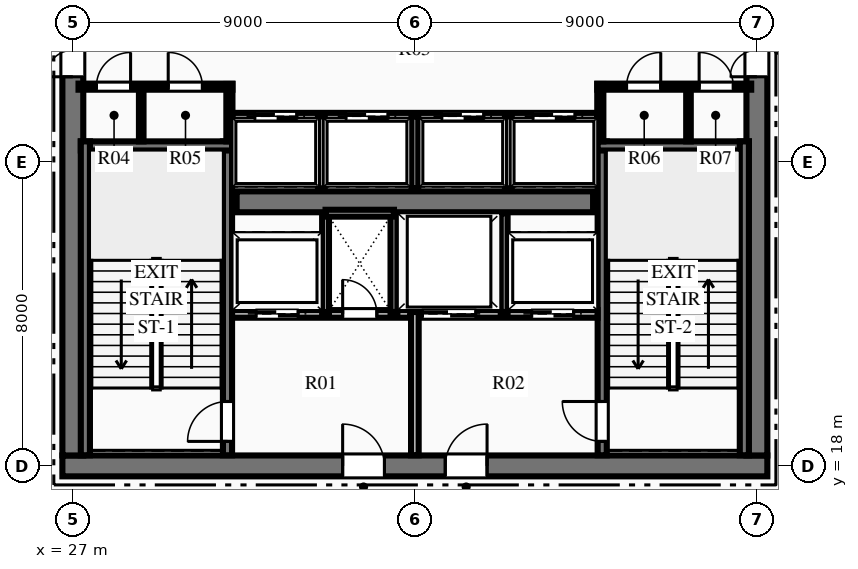
"""IFC4 building model, lengths in metres.
Left out: names, types, materials, properties, quantities, classifications, styles, units other than length and angle.
Written with IfcOpenShell. Run it as: python <this file> out.ifc"""

import sys

from ifc_helpers import new_model, si_unit, direction, frame, frame_2d, origin, place, context, subcontext, project, spatial, rectangle, extrude, element, fill, save


model = new_model("IFC4")
c1 = context("Model", 3, precision=1e-05, world=origin(), true_north=direction((0.0, 1.0)))
c2 = subcontext(c1, "Body", "Model", "MODEL_VIEW")
j1 = project(units=[si_unit("LENGTHUNIT", "METRE"), si_unit("PLANEANGLEUNIT", "RADIAN")], contexts=[c1])
p1 = place(None, origin())
s1 = spatial("IfcSite", under=j1, at=p1, CompositionType="ELEMENT")
p2 = place(p1, origin())
s2 = spatial("IfcBuilding", under=s1, at=p2, CompositionType="ELEMENT")
p3 = place(p2, frame((0.0, 0.0, 85.95)))
s3 = spatial("IfcBuildingStorey", under=s2, at=p3, CompositionType="ELEMENT", Elevation=85.95)
p4 = place(p3, frame((26.725, 18.0, 0.0), z_axis=(0.0, 0.0, 1.0), x_axis=(1.0, 0.0, 0.0)))
e1 = element("IfcWall", 1, at=p4, inside=s3, PredefinedType="SHEAR", context=c2, shape_type="SweptSolid", body=[
    extrude(rectangle(XDim=18.55, YDim=0.55, at=frame_2d((9.275, 0.0))), origin(), (0.0, 0.0, 1.0), 4.5),
])
p5 = place(p4, frame((7.375, 0.0, 0.0)))
e2 = element("IfcOpeningElement", 2, at=p5, cuts=e1, PredefinedType="OPENING", context=c2, shape_type="SweptSolid", body=[
    extrude(rectangle(XDim=1.1, YDim=2.15, at=frame_2d((0.55, 1.075))), frame((0.0, 0.285, 0.0), z_axis=(0.0, -1.0, 0.0), x_axis=(1.0, 0.0, 0.0)), (0.0, 0.0, 1.0), 0.57),
])
p6 = place(p4, frame((10.075, 0.0, 0.0)))
e3 = element("IfcOpeningElement", 3, at=p6, cuts=e1, PredefinedType="OPENING", context=c2, shape_type="SweptSolid", body=[
    extrude(rectangle(XDim=1.1, YDim=2.15, at=frame_2d((0.55, 1.075))), frame((0.0, 0.285, 0.0), z_axis=(0.0, -1.0, 0.0), x_axis=(1.0, 0.0, 0.0)), (0.0, 0.0, 1.0), 0.57),
])
p7 = place(p3, frame((27.0, 18.275, 0.0), z_axis=(0.0, 0.0, 1.0), x_axis=(0.0, 1.0, 0.0)))
e4 = element("IfcWall", 4, at=p7, inside=s3, PredefinedType="SHEAR", context=c2, shape_type="SweptSolid", body=[
    extrude(rectangle(XDim=15.45, YDim=0.55, at=frame_2d((7.725, 0.0))), origin(), (0.0, 0.0, 1.0), 4.5),
])
p8 = place(p7, frame((9.965, 0.0, 0.0)))
e5 = element("IfcOpeningElement", 5, at=p8, cuts=e4, PredefinedType="OPENING", context=c2, shape_type="SweptSolid", body=[
    extrude(rectangle(XDim=1.4, YDim=2.2, at=frame_2d((0.7, 1.1))), frame((0.0, 0.285, 0.0), z_axis=(0.0, -1.0, 0.0), x_axis=(1.0, 0.0, 0.0)), (0.0, 0.0, 1.0), 0.57),
])
p9 = place(p3, frame((45.0, 18.275, 0.0), z_axis=(0.0, 0.0, 1.0), x_axis=(0.0, 1.0, 0.0)))
e6 = element("IfcWall", 6, at=p9, inside=s3, PredefinedType="SHEAR", context=c2, shape_type="SweptSolid", body=[
    extrude(rectangle(XDim=15.45, YDim=0.55, at=frame_2d((7.725, 0.0))), origin(), (0.0, 0.0, 1.0), 4.5),
])
p10 = place(p9, frame((9.965, 0.0, 0.0)))
e7 = element("IfcOpeningElement", 7, at=p10, cuts=e6, PredefinedType="OPENING", context=c2, shape_type="SweptSolid", body=[
    extrude(rectangle(XDim=1.4, YDim=2.2, at=frame_2d((0.7, 1.1))), frame((0.0, 0.285, 0.0), z_axis=(0.0, -1.0, 0.0), x_axis=(1.0, 0.0, 0.0)), (0.0, 0.0, 1.0), 0.57),
])
p11 = place(p3, frame((31.31, 24.95, 0.0), z_axis=(0.0, 0.0, 1.0), x_axis=(1.0, 0.0, 0.0)))
e8 = element("IfcWall", 8, at=p11, inside=s3, PredefinedType="SHEAR", context=c2, shape_type="SweptSolid", body=[
    extrude(rectangle(XDim=9.38, YDim=0.55, at=frame_2d((4.69, 0.0))), origin(), (0.0, 0.0, 1.0), 4.5),
])
p12 = place(p3, frame((31.07, 18.28, 0.0), z_axis=(0.0, 0.0, 1.0), x_axis=(0.0, 1.0, 0.0)))
e9 = element("IfcWall", 9, at=p12, inside=s3, PredefinedType="SHEAR", context=c2, shape_type="SweptSolid", body=[
    extrude(rectangle(XDim=8.26, YDim=0.24, at=frame_2d((4.13, 0.0))), origin(), (0.0, 0.0, 1.0), 4.5),
])
p13 = place(p12, frame((0.365, 0.0, 0.0)))
e10 = element("IfcOpeningElement", 10, at=p13, cuts=e9, PredefinedType="OPENING", context=c2, shape_type="SweptSolid", body=[
    extrude(rectangle(XDim=1.05, YDim=2.15, at=frame_2d((0.525, 1.075))), frame((0.0, 0.13, 0.0), z_axis=(0.0, -1.0, 0.0), x_axis=(1.0, 0.0, 0.0)), (0.0, 0.0, 1.0), 0.26),
])
p14 = place(p3, frame((27.21, 26.42, 0.0), z_axis=(0.0, 0.0, 1.0), x_axis=(1.0, 0.0, 0.0)))
e11 = element("IfcWall", 11, at=p14, inside=s3, PredefinedType="SHEAR", context=c2, shape_type="SweptSolid", body=[
    extrude(rectangle(XDim=3.98, YDim=0.24, at=frame_2d((1.99, 0.0))), origin(), (0.0, 0.0, 1.0), 4.5),
])
p15 = place(p3, frame((27.33, 18.28, 0.0), z_axis=(0.0, 0.0, 1.0), x_axis=(0.0, 1.0, 0.0)))
e12 = element("IfcWall", 12, at=p15, inside=s3, PredefinedType="SHEAR", context=c2, shape_type="SweptSolid", body=[
    extrude(rectangle(XDim=8.26, YDim=0.24, at=frame_2d((4.13, 0.0))), origin(), (0.0, 0.0, 1.0), 4.5),
])
p16 = place(p3, frame((40.93, 18.28, 0.0), z_axis=(0.0, 0.0, 1.0), x_axis=(0.0, 1.0, 0.0)))
e13 = element("IfcWall", 13, at=p16, inside=s3, PredefinedType="SHEAR", context=c2, shape_type="SweptSolid", body=[
    extrude(rectangle(XDim=8.26, YDim=0.24, at=frame_2d((4.13, 0.0))), origin(), (0.0, 0.0, 1.0), 4.5),
])
p17 = place(p16, frame((0.365, 0.0, 0.0)))
e14 = element("IfcOpeningElement", 14, at=p17, cuts=e13, PredefinedType="OPENING", context=c2, shape_type="SweptSolid", body=[
    extrude(rectangle(XDim=1.05, YDim=2.15, at=frame_2d((0.525, 1.075))), frame((0.0, 0.13, 0.0), z_axis=(0.0, -1.0, 0.0), x_axis=(1.0, 0.0, 0.0)), (0.0, 0.0, 1.0), 0.26),
])
p18 = place(p3, frame((40.81, 26.42, 0.0), z_axis=(0.0, 0.0, 1.0), x_axis=(1.0, 0.0, 0.0)))
e15 = element("IfcWall", 15, at=p18, inside=s3, PredefinedType="SHEAR", context=c2, shape_type="SweptSolid", body=[
    extrude(rectangle(XDim=3.98, YDim=0.24, at=frame_2d((1.99, 0.0))), origin(), (0.0, 0.0, 1.0), 4.5),
])
p19 = place(p3, frame((44.67, 18.28, 0.0), z_axis=(0.0, 0.0, 1.0), x_axis=(0.0, 1.0, 0.0)))
e16 = element("IfcWall", 16, at=p19, inside=s3, PredefinedType="SHEAR", context=c2, shape_type="SweptSolid", body=[
    extrude(rectangle(XDim=8.26, YDim=0.24, at=frame_2d((4.13, 0.0))), origin(), (0.0, 0.0, 1.0), 4.5),
])
p20 = place(p3, frame((36.0, 18.28, 0.0), z_axis=(0.0, 0.0, 1.0), x_axis=(0.0, 1.0, 0.0)))
e17 = element("IfcWall", 17, at=p20, inside=s3, PredefinedType="PARTITIONING", context=c2, shape_type="SweptSolid", body=[
    extrude(rectangle(XDim=3.77, YDim=0.2, at=frame_2d((1.885, 0.0))), origin(), (0.0, 0.0, 1.0), 4.2),
])
p21 = place(p3, frame((31.19, 22.0, 0.0), z_axis=(0.0, 0.0, 1.0), x_axis=(1.0, 0.0, 0.0)))
e18 = element("IfcWall", 18, at=p21, inside=s3, PredefinedType="PARTITIONING", context=c2, shape_type="SweptSolid", body=[
    extrude(rectangle(XDim=4.69, YDim=0.2, at=frame_2d((2.345, 0.0))), origin(), (0.0, 0.0, 1.0), 4.2),
])
p22 = place(p21, frame((2.91, 0.0, 0.0)))
e19 = element("IfcOpeningElement", 19, at=p22, cuts=e18, PredefinedType="OPENING", context=c2, shape_type="SweptSolid", body=[
    extrude(rectangle(XDim=0.9, YDim=2.15, at=frame_2d((0.45, 1.075))), frame((0.0, 0.11, 0.0), z_axis=(0.0, -1.0, 0.0), x_axis=(1.0, 0.0, 0.0)), (0.0, 0.0, 1.0), 0.22),
])
p23 = place(p21, frame((0.635, 0.0, 0.0)))
e20 = element("IfcOpeningElement", 20, at=p23, cuts=e18, PredefinedType="OPENING", context=c2, shape_type="SweptSolid", body=[
    extrude(rectangle(XDim=1.1, YDim=2.15, at=frame_2d((0.55, 1.075))), frame((0.0, 0.11, 0.0), z_axis=(0.0, -1.0, 0.0), x_axis=(1.0, 0.0, 0.0)), (0.0, 0.0, 1.0), 0.22),
])
p24 = place(p3, frame((36.12, 22.0, 0.0), z_axis=(0.0, 0.0, 1.0), x_axis=(1.0, 0.0, 0.0)))
e21 = element("IfcWall", 21, at=p24, inside=s3, PredefinedType="PARTITIONING", context=c2, shape_type="SweptSolid", body=[
    extrude(rectangle(XDim=4.69, YDim=0.2, at=frame_2d((2.345, 0.0))), origin(), (0.0, 0.0, 1.0), 4.2),
])
p25 = place(p24, frame((2.955, 0.0, 0.0)))
e22 = element("IfcOpeningElement", 22, at=p25, cuts=e21, PredefinedType="OPENING", context=c2, shape_type="SweptSolid", body=[
    extrude(rectangle(XDim=1.1, YDim=2.15, at=frame_2d((0.55, 1.075))), frame((0.0, 0.11, 0.0), z_axis=(0.0, -1.0, 0.0), x_axis=(1.0, 0.0, 0.0)), (0.0, 0.0, 1.0), 0.22),
])
p26 = place(p24, frame((0.08, 0.0, 0.0)))
e23 = element("IfcOpeningElement", 23, at=p26, cuts=e21, PredefinedType="OPENING", context=c2, shape_type="SweptSolid", body=[
    extrude(rectangle(XDim=1.4, YDim=2.2, at=frame_2d((0.7, 1.1))), frame((0.0, 0.11, 0.0), z_axis=(0.0, -1.0, 0.0), x_axis=(1.0, 0.0, 0.0)), (0.0, 0.0, 1.0), 0.22),
])
for number, where, z_axis, x_axis in (
    (24, (33.65, 22.05, 0.0), (0.0, 0.0, 1.0), (0.0, 1.0, 0.0)),
    (25, (35.45, 22.05, 0.0), (0.0, 0.0, 1.0), (0.0, 1.0, 0.0)),
):
    element("IfcWall", number, at=place(p3, frame(where, z_axis=z_axis, x_axis=x_axis)), inside=s3, PredefinedType="PARTITIONING", context=c2, shape_type="SweptSolid", body=[
        extrude(rectangle(XDim=2.6, YDim=0.18, at=frame_2d((1.3, 0.0))), origin(), (0.0, 0.0, 1.0), 4.2),
    ])
p27 = place(p3, frame((33.65, 24.65, 0.0), z_axis=(0.0, 0.0, 1.0), x_axis=(1.0, 0.0, 0.0)))
e26 = element("IfcWall", 26, at=p27, inside=s3, PredefinedType="PARTITIONING", context=c2, shape_type="SweptSolid", body=[
    extrude(rectangle(XDim=1.8, YDim=0.18, at=frame_2d((0.9, 0.0))), origin(), (0.0, 0.0, 1.0), 4.2),
])
p28 = place(p3, frame((38.35, 22.05, 0.0), z_axis=(0.0, 0.0, 1.0), x_axis=(0.0, 1.0, 0.0)))
e27 = element("IfcWall", 27, at=p28, inside=s3, PredefinedType="PARTITIONING", context=c2, shape_type="SweptSolid", body=[
    extrude(rectangle(XDim=2.6, YDim=0.18, at=frame_2d((1.3, 0.0))), origin(), (0.0, 0.0, 1.0), 4.2),
])
p29 = place(p3, frame((27.15, 27.98, 0.0), z_axis=(0.0, 0.0, 1.0), x_axis=(1.0, 0.0, 0.0)))
e28 = element("IfcWall", 28, at=p29, inside=s3, PredefinedType="PARTITIONING", context=c2, shape_type="SweptSolid", body=[
    extrude(rectangle(XDim=4.05, YDim=0.16, at=frame_2d((2.025, 0.0))), origin(), (0.0, 0.0, 1.0), 4.2),
])
p30 = place(p29, frame((0.47, 0.0, 0.0)))
e29 = element("IfcOpeningElement", 29, at=p30, cuts=e28, PredefinedType="OPENING", context=c2, shape_type="SweptSolid", body=[
    extrude(rectangle(XDim=0.9, YDim=2.15, at=frame_2d((0.45, 1.075))), frame((0.0, 0.09, 0.0), z_axis=(0.0, -1.0, 0.0), x_axis=(1.0, 0.0, 0.0)), (0.0, 0.0, 1.0), 0.18),
])
p31 = place(p29, frame((2.36, 0.0, 0.0)))
e30 = element("IfcOpeningElement", 30, at=p31, cuts=e28, PredefinedType="OPENING", context=c2, shape_type="SweptSolid", body=[
    extrude(rectangle(XDim=0.9, YDim=2.15, at=frame_2d((0.45, 1.075))), frame((0.0, 0.09, 0.0), z_axis=(0.0, -1.0, 0.0), x_axis=(1.0, 0.0, 0.0)), (0.0, 0.0, 1.0), 0.18),
])
p32 = place(p3, frame((31.12, 26.54, 0.0), z_axis=(0.0, 0.0, 1.0), x_axis=(0.0, 1.0, 0.0)))
e31 = element("IfcWall", 31, at=p32, inside=s3, PredefinedType="PARTITIONING", context=c2, shape_type="SweptSolid", body=[
    extrude(rectangle(XDim=1.51, YDim=0.16, at=frame_2d((0.755, 0.0))), origin(), (0.0, 0.0, 1.0), 4.2),
])
p33 = place(p3, frame((40.8, 27.98, 0.0), z_axis=(0.0, 0.0, 1.0), x_axis=(1.0, 0.0, 0.0)))
e32 = element("IfcWall", 32, at=p33, inside=s3, PredefinedType="PARTITIONING", context=c2, shape_type="SweptSolid", body=[
    extrude(rectangle(XDim=4.05, YDim=0.16, at=frame_2d((2.025, 0.0))), origin(), (0.0, 0.0, 1.0), 4.2),
])
p34 = place(p33, frame((0.77, 0.0, 0.0)))
e33 = element("IfcOpeningElement", 33, at=p34, cuts=e32, PredefinedType="OPENING", context=c2, shape_type="SweptSolid", body=[
    extrude(rectangle(XDim=0.9, YDim=2.15, at=frame_2d((0.45, 1.075))), frame((0.0, 0.09, 0.0), z_axis=(0.0, -1.0, 0.0), x_axis=(1.0, 0.0, 0.0)), (0.0, 0.0, 1.0), 0.18),
])
p35 = place(p33, frame((2.68, 0.0, 0.0)))
e34 = element("IfcOpeningElement", 34, at=p35, cuts=e32, PredefinedType="OPENING", context=c2, shape_type="SweptSolid", body=[
    extrude(rectangle(XDim=0.9, YDim=2.15, at=frame_2d((0.45, 1.075))), frame((0.0, 0.09, 0.0), z_axis=(0.0, -1.0, 0.0), x_axis=(1.0, 0.0, 0.0)), (0.0, 0.0, 1.0), 0.18),
])
p36 = place(p3, frame((40.88, 26.54, 0.0), z_axis=(0.0, 0.0, 1.0), x_axis=(0.0, 1.0, 0.0)))
e35 = element("IfcWall", 35, at=p36, inside=s3, PredefinedType="PARTITIONING", context=c2, shape_type="SweptSolid", body=[
    extrude(rectangle(XDim=1.51, YDim=0.16, at=frame_2d((0.755, 0.0))), origin(), (0.0, 0.0, 1.0), 4.2),
])
for number, where, z_axis, x_axis in (
    (36, (28.8, 26.54, 0.0), (0.0, 0.0, 1.0), (0.0, 1.0, 0.0)),
    (37, (43.2, 26.54, 0.0), (0.0, 0.0, 1.0), (0.0, 1.0, 0.0)),
):
    element("IfcWall", number, at=place(p3, frame(where, z_axis=z_axis, x_axis=x_axis)), inside=s3, PredefinedType="PARTITIONING", context=c2, shape_type="SweptSolid", body=[
        extrude(rectangle(XDim=1.44, YDim=0.12, at=frame_2d((0.72, 0.0))), origin(), (0.0, 0.0, 1.0), 4.2),
    ])
p37 = place(p3, frame((31.2, 27.2, 0.0), z_axis=(0.0, 0.0, 1.0), x_axis=(1.0, 0.0, 0.0)))
e38 = element("IfcWall", 38, at=p37, inside=s3, PredefinedType="PARTITIONING", context=c2, shape_type="SweptSolid", body=[
    extrude(rectangle(XDim=9.6, YDim=0.18, at=frame_2d((4.8, 0.0))), origin(), (0.0, 0.0, 1.0), 4.2),
])
p38 = place(p37, frame((0.59, 0.0, 0.0)))
e39 = element("IfcOpeningElement", 39, at=p38, cuts=e38, PredefinedType="OPENING", context=c2, shape_type="SweptSolid", body=[
    extrude(rectangle(XDim=1.1, YDim=2.15, at=frame_2d((0.55, 1.075))), frame((0.0, 0.1, 0.0), z_axis=(0.0, -1.0, 0.0), x_axis=(1.0, 0.0, 0.0)), (0.0, 0.0, 1.0), 0.2),
])
p39 = place(p37, frame((2.99, 0.0, 0.0)))
e40 = element("IfcOpeningElement", 40, at=p39, cuts=e38, PredefinedType="OPENING", context=c2, shape_type="SweptSolid", body=[
    extrude(rectangle(XDim=1.1, YDim=2.15, at=frame_2d((0.55, 1.075))), frame((0.0, 0.1, 0.0), z_axis=(0.0, -1.0, 0.0), x_axis=(1.0, 0.0, 0.0)), (0.0, 0.0, 1.0), 0.2),
])
p40 = place(p37, frame((5.51, 0.0, 0.0)))
e41 = element("IfcOpeningElement", 41, at=p40, cuts=e38, PredefinedType="OPENING", context=c2, shape_type="SweptSolid", body=[
    extrude(rectangle(XDim=1.1, YDim=2.15, at=frame_2d((0.55, 1.075))), frame((0.0, 0.1, 0.0), z_axis=(0.0, -1.0, 0.0), x_axis=(1.0, 0.0, 0.0)), (0.0, 0.0, 1.0), 0.2),
])
p41 = place(p37, frame((7.91, 0.0, 0.0)))
e42 = element("IfcOpeningElement", 42, at=p41, cuts=e38, PredefinedType="OPENING", context=c2, shape_type="SweptSolid", body=[
    extrude(rectangle(XDim=1.1, YDim=2.15, at=frame_2d((0.55, 1.075))), frame((0.0, 0.1, 0.0), z_axis=(0.0, -1.0, 0.0), x_axis=(1.0, 0.0, 0.0)), (0.0, 0.0, 1.0), 0.2),
])
for number, where, z_axis, x_axis in (
    (43, (33.54, 25.3, 0.0), (0.0, 0.0, 1.0), (0.0, 1.0, 0.0)),
    (44, (36.0, 25.3, 0.0), (0.0, 0.0, 1.0), (0.0, 1.0, 0.0)),
    (45, (38.46, 25.3, 0.0), (0.0, 0.0, 1.0), (0.0, 1.0, 0.0)),
):
    element("IfcWall", number, at=place(p3, frame(where, z_axis=z_axis, x_axis=x_axis)), inside=s3, PredefinedType="PARTITIONING", context=c2, shape_type="SweptSolid", body=[
        extrude(rectangle(XDim=1.9, YDim=0.18, at=frame_2d((0.95, 0.0))), origin(), (0.0, 0.0, 1.0), 4.2),
    ])
p42 = place(p30, origin())
e46 = element("IfcDoor", 46, at=p42, inside=s3, OperationType="SINGLE_SWING_RIGHT", PredefinedType="DOOR", context=c2, shape_type="SweptSolid", body=[
    extrude(rectangle(XDim=0.9, YDim=2.15, at=frame_2d((0.45, 1.075))), frame((0.0, 0.025, 0.0), z_axis=(0.0, -1.0, 0.0), x_axis=(1.0, 0.0, 0.0)), (0.0, 0.0, 1.0), 0.05),
])
fill(e29, e46)
p43 = place(p31, origin())
e47 = element("IfcDoor", 47, at=p43, inside=s3, OperationType="SINGLE_SWING_LEFT", PredefinedType="DOOR", context=c2, shape_type="SweptSolid", body=[
    extrude(rectangle(XDim=0.9, YDim=2.15, at=frame_2d((0.45, 1.075))), frame((0.0, 0.025, 0.0), z_axis=(0.0, -1.0, 0.0), x_axis=(1.0, 0.0, 0.0)), (0.0, 0.0, 1.0), 0.05),
])
fill(e30, e47)
p44 = place(p34, origin())
e48 = element("IfcDoor", 48, at=p44, inside=s3, OperationType="SINGLE_SWING_RIGHT", PredefinedType="DOOR", context=c2, shape_type="SweptSolid", body=[
    extrude(rectangle(XDim=0.9, YDim=2.15, at=frame_2d((0.45, 1.075))), frame((0.0, 0.025, 0.0), z_axis=(0.0, -1.0, 0.0), x_axis=(1.0, 0.0, 0.0)), (0.0, 0.0, 1.0), 0.05),
])
fill(e33, e48)
p45 = place(p35, origin())
e49 = element("IfcDoor", 49, at=p45, inside=s3, OperationType="SINGLE_SWING_LEFT", PredefinedType="DOOR", context=c2, shape_type="SweptSolid", body=[
    extrude(rectangle(XDim=0.9, YDim=2.15, at=frame_2d((0.45, 1.075))), frame((0.0, 0.025, 0.0), z_axis=(0.0, -1.0, 0.0), x_axis=(1.0, 0.0, 0.0)), (0.0, 0.0, 1.0), 0.05),
])
fill(e34, e49)
p46 = place(p13, origin())
e50 = element("IfcDoor", 50, at=p46, inside=s3, OperationType="SINGLE_SWING_LEFT", PredefinedType="DOOR", context=c2, shape_type="SweptSolid", body=[
    extrude(rectangle(XDim=1.05, YDim=2.15, at=frame_2d((0.525, 1.075))), frame((0.0, 0.025, 0.0), z_axis=(0.0, -1.0, 0.0), x_axis=(1.0, 0.0, 0.0)), (0.0, 0.0, 1.0), 0.05),
])
fill(e10, e50)
p47 = place(p17, origin())
e51 = element("IfcDoor", 51, at=p47, inside=s3, OperationType="SINGLE_SWING_RIGHT", PredefinedType="DOOR", context=c2, shape_type="SweptSolid", body=[
    extrude(rectangle(XDim=1.05, YDim=2.15, at=frame_2d((0.525, 1.075))), frame((0.0, 0.025, 0.0), z_axis=(0.0, -1.0, 0.0), x_axis=(1.0, 0.0, 0.0)), (0.0, 0.0, 1.0), 0.05),
])
fill(e14, e51)
p48 = place(p5, origin())
e52 = element("IfcDoor", 52, at=p48, inside=s3, OperationType="SINGLE_SWING_LEFT", PredefinedType="DOOR", context=c2, shape_type="SweptSolid", body=[
    extrude(rectangle(XDim=1.1, YDim=2.15, at=frame_2d((0.55, 1.075))), frame((0.0, 0.025, 0.0), z_axis=(0.0, -1.0, 0.0), x_axis=(1.0, 0.0, 0.0)), (0.0, 0.0, 1.0), 0.05),
])
fill(e2, e52)
p49 = place(p6, origin())
e53 = element("IfcDoor", 53, at=p49, inside=s3, OperationType="SINGLE_SWING_RIGHT", PredefinedType="DOOR", context=c2, shape_type="SweptSolid", body=[
    extrude(rectangle(XDim=1.1, YDim=2.15, at=frame_2d((0.55, 1.075))), frame((0.0, 0.025, 0.0), z_axis=(0.0, -1.0, 0.0), x_axis=(1.0, 0.0, 0.0)), (0.0, 0.0, 1.0), 0.05),
])
fill(e3, e53)
p50 = place(p22, origin())
e54 = element("IfcDoor", 54, at=p50, inside=s3, OperationType="SINGLE_SWING_LEFT", PredefinedType="DOOR", context=c2, shape_type="SweptSolid", body=[
    extrude(rectangle(XDim=0.9, YDim=2.15, at=frame_2d((0.45, 1.075))), frame((0.0, 0.025, 0.0), z_axis=(0.0, -1.0, 0.0), x_axis=(1.0, 0.0, 0.0)), (0.0, 0.0, 1.0), 0.05),
])
fill(e19, e54)
p51 = place(p8, origin())
e55 = element("IfcDoor", 55, at=p51, inside=s3, OperationType="DOUBLE_DOOR_SINGLE_SWING", PredefinedType="DOOR", context=c2, shape_type="SweptSolid", body=[
    extrude(rectangle(XDim=1.4, YDim=2.2, at=frame_2d((0.7, 1.1))), frame((0.0, 0.025, 0.0), z_axis=(0.0, -1.0, 0.0), x_axis=(1.0, 0.0, 0.0)), (0.0, 0.0, 1.0), 0.05),
])
fill(e5, e55)
p52 = place(p10, origin())
e56 = element("IfcDoor", 56, at=p52, inside=s3, OperationType="DOUBLE_DOOR_SINGLE_SWING", PredefinedType="DOOR", context=c2, shape_type="SweptSolid", body=[
    extrude(rectangle(XDim=1.4, YDim=2.2, at=frame_2d((0.7, 1.1))), frame((0.0, 0.025, 0.0), z_axis=(0.0, -1.0, 0.0), x_axis=(1.0, 0.0, 0.0)), (0.0, 0.0, 1.0), 0.05),
])
fill(e7, e56)
p53 = place(p38, origin())
e57 = element("IfcDoor", 57, at=p53, inside=s3, OperationType="SLIDING_TO_LEFT", PredefinedType="DOOR", context=c2, shape_type="SweptSolid", body=[
    extrude(rectangle(XDim=1.1, YDim=2.15, at=frame_2d((0.55, 1.075))), frame((0.0, 0.025, 0.0), z_axis=(0.0, -1.0, 0.0), x_axis=(1.0, 0.0, 0.0)), (0.0, 0.0, 1.0), 0.05),
])
fill(e39, e57)
p54 = place(p39, origin())
e58 = element("IfcDoor", 58, at=p54, inside=s3, OperationType="SLIDING_TO_LEFT", PredefinedType="DOOR", context=c2, shape_type="SweptSolid", body=[
    extrude(rectangle(XDim=1.1, YDim=2.15, at=frame_2d((0.55, 1.075))), frame((0.0, 0.025, 0.0), z_axis=(0.0, -1.0, 0.0), x_axis=(1.0, 0.0, 0.0)), (0.0, 0.0, 1.0), 0.05),
])
fill(e40, e58)
p55 = place(p40, origin())
e59 = element("IfcDoor", 59, at=p55, inside=s3, OperationType="SLIDING_TO_LEFT", PredefinedType="DOOR", context=c2, shape_type="SweptSolid", body=[
    extrude(rectangle(XDim=1.1, YDim=2.15, at=frame_2d((0.55, 1.075))), frame((0.0, 0.025, 0.0), z_axis=(0.0, -1.0, 0.0), x_axis=(1.0, 0.0, 0.0)), (0.0, 0.0, 1.0), 0.05),
])
fill(e41, e59)
p56 = place(p41, origin())
e60 = element("IfcDoor", 60, at=p56, inside=s3, OperationType="SLIDING_TO_LEFT", PredefinedType="DOOR", context=c2, shape_type="SweptSolid", body=[
    extrude(rectangle(XDim=1.1, YDim=2.15, at=frame_2d((0.55, 1.075))), frame((0.0, 0.025, 0.0), z_axis=(0.0, -1.0, 0.0), x_axis=(1.0, 0.0, 0.0)), (0.0, 0.0, 1.0), 0.05),
])
fill(e42, e60)
p57 = place(p23, origin())
e61 = element("IfcDoor", 61, at=p57, inside=s3, OperationType="SLIDING_TO_LEFT", PredefinedType="DOOR", context=c2, shape_type="SweptSolid", body=[
    extrude(rectangle(XDim=1.1, YDim=2.15, at=frame_2d((0.55, 1.075))), frame((0.0, 0.025, 0.0), z_axis=(0.0, -1.0, 0.0), x_axis=(1.0, 0.0, 0.0)), (0.0, 0.0, 1.0), 0.05),
])
fill(e20, e61)
p58 = place(p25, origin())
e62 = element("IfcDoor", 62, at=p58, inside=s3, OperationType="SLIDING_TO_LEFT", PredefinedType="DOOR", context=c2, shape_type="SweptSolid", body=[
    extrude(rectangle(XDim=1.1, YDim=2.15, at=frame_2d((0.55, 1.075))), frame((0.0, 0.025, 0.0), z_axis=(0.0, -1.0, 0.0), x_axis=(1.0, 0.0, 0.0)), (0.0, 0.0, 1.0), 0.05),
])
fill(e22, e62)
p59 = place(p26, origin())
e63 = element("IfcDoor", 63, at=p59, inside=s3, OperationType="SLIDING_TO_LEFT", PredefinedType="DOOR", context=c2, shape_type="SweptSolid", body=[
    extrude(rectangle(XDim=1.4, YDim=2.2, at=frame_2d((0.7, 1.1))), frame((0.0, 0.025, 0.0), z_axis=(0.0, -1.0, 0.0), x_axis=(1.0, 0.0, 0.0)), (0.0, 0.0, 1.0), 0.05),
])
fill(e23, e63)
save(model, sys.argv[1])
